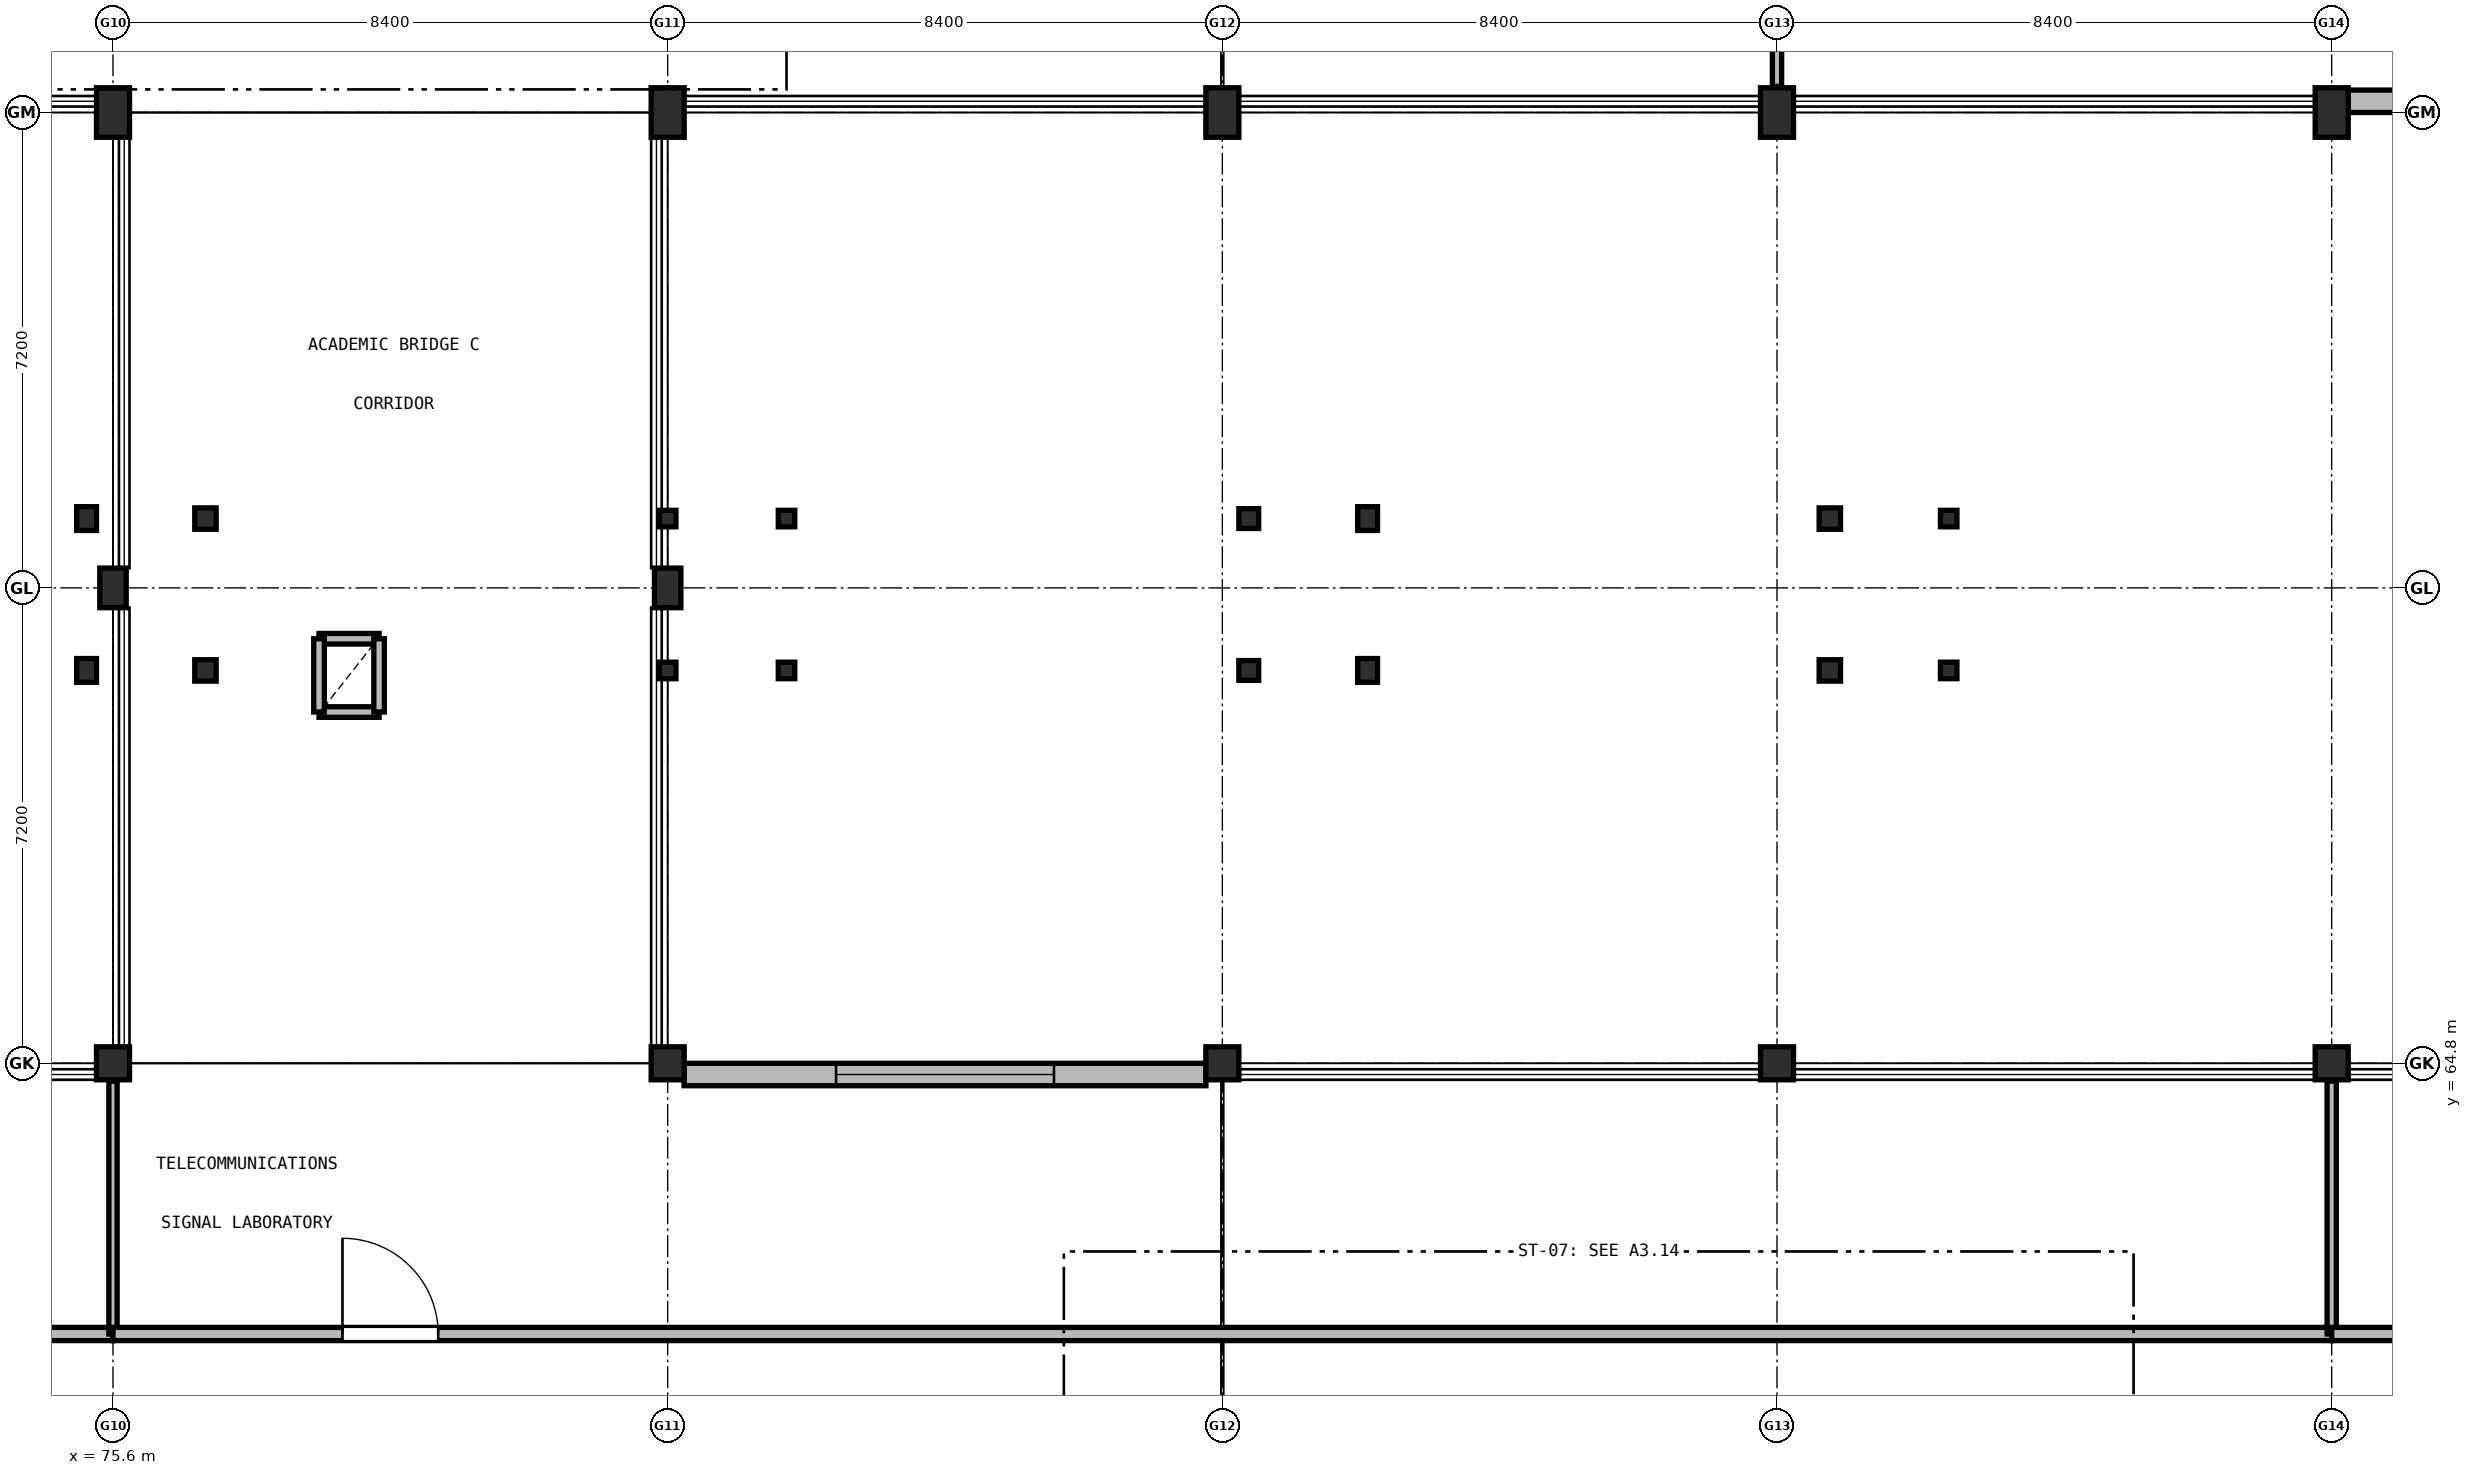
"""IFC4 building model, lengths in metres.
Left out: names, types, materials, properties, quantities, classifications, styles, units other than length and angle.
Written with IfcOpenShell. Run it as: python <this file> out.ifc"""

import sys

from ifc_helpers import new_model, si_unit, direction, frame, frame_2d, origin, origin_2d, place, context, subcontext, project, spatial, rectangle, hollow_rectangle, hollow_circle, i_section, extrude, element, fill, save


model = new_model("IFC4")
c1 = context("Model", 3, precision=1e-05, world=origin(), true_north=direction((0.0, 1.0)))
c2 = subcontext(c1, "Body", "Model", "MODEL_VIEW")
j1 = project(units=[si_unit("LENGTHUNIT", "METRE"), si_unit("PLANEANGLEUNIT", "RADIAN")], contexts=[c1])
p1 = place(None, origin())
s1 = spatial("IfcSite", under=j1, at=p1, CompositionType="ELEMENT")
p2 = place(p1, origin())
s2 = spatial("IfcBuilding", under=s1, at=p2, CompositionType="ELEMENT")
p3 = place(p2, frame((0.0, 0.0, 5.1)))
s3 = spatial("IfcBuildingStorey", under=s2, at=p3, CompositionType="ELEMENT", Elevation=5.1)
p4 = place(p3, frame((75.6, 64.8, 0.0), z_axis=(0.0, 0.0, 1.0), x_axis=(1.0, 0.0, 0.0)))
e1 = element("IfcColumn", 1, at=p4, inside=s3, PredefinedType="COLUMN", context=c2, shape_type="SweptSolid", body=[
    extrude(rectangle(XDim=0.5, YDim=0.5, at=origin_2d()), origin(), (0.0, 0.0, 1.0), 4.2),
])
p5 = place(p3, frame((75.6, 72.0, 0.0), z_axis=(0.0, 0.0, 1.0), x_axis=(1.0, 0.0, 0.0)))
e2 = element("IfcColumn", 2, at=p5, inside=s3, PredefinedType="COLUMN", context=c2, shape_type="SweptSolid", body=[
    extrude(rectangle(XDim=0.4, YDim=0.6, at=origin_2d()), origin(), (0.0, 0.0, 1.0), 4.2),
])
p6 = place(p3, frame((75.6, 79.2, 0.0), z_axis=(0.0, 0.0, 1.0), x_axis=(1.0, 0.0, 0.0)))
e3 = element("IfcColumn", 3, at=p6, inside=s3, PredefinedType="COLUMN", context=c2, shape_type="SweptSolid", body=[
    extrude(rectangle(XDim=0.5, YDim=0.75, at=origin_2d()), origin(), (0.0, 0.0, 1.0), 4.2),
])
p7 = place(p3, frame((84.0, 64.8, 0.0), z_axis=(0.0, 0.0, 1.0), x_axis=(1.0, 0.0, 0.0)))
e4 = element("IfcColumn", 4, at=p7, inside=s3, PredefinedType="COLUMN", context=c2, shape_type="SweptSolid", body=[
    extrude(rectangle(XDim=0.5, YDim=0.5, at=origin_2d()), origin(), (0.0, 0.0, 1.0), 4.2),
])
p8 = place(p3, frame((84.0, 72.0, 0.0), z_axis=(0.0, 0.0, 1.0), x_axis=(1.0, 0.0, 0.0)))
e5 = element("IfcColumn", 5, at=p8, inside=s3, PredefinedType="COLUMN", context=c2, shape_type="SweptSolid", body=[
    extrude(rectangle(XDim=0.4, YDim=0.6, at=origin_2d()), origin(), (0.0, 0.0, 1.0), 4.2),
])
p9 = place(p3, frame((84.0, 79.2, 0.0), z_axis=(0.0, 0.0, 1.0), x_axis=(1.0, 0.0, 0.0)))
e6 = element("IfcColumn", 6, at=p9, inside=s3, PredefinedType="COLUMN", context=c2, shape_type="SweptSolid", body=[
    extrude(rectangle(XDim=0.5, YDim=0.75, at=origin_2d()), origin(), (0.0, 0.0, 1.0), 4.2),
])
p10 = place(p3, frame((92.4, 64.8, 0.0), z_axis=(0.0, 0.0, 1.0), x_axis=(1.0, 0.0, 0.0)))
e7 = element("IfcColumn", 7, at=p10, inside=s3, PredefinedType="COLUMN", context=c2, shape_type="SweptSolid", body=[
    extrude(rectangle(XDim=0.5, YDim=0.5, at=origin_2d()), origin(), (0.0, 0.0, 1.0), 4.2),
])
p11 = place(p3, frame((92.4, 79.2, 0.0), z_axis=(0.0, 0.0, 1.0), x_axis=(1.0, 0.0, 0.0)))
e8 = element("IfcColumn", 8, at=p11, inside=s3, PredefinedType="COLUMN", context=c2, shape_type="SweptSolid", body=[
    extrude(rectangle(XDim=0.5, YDim=0.75, at=origin_2d()), origin(), (0.0, 0.0, 1.0), 4.2),
])
p12 = place(p3, frame((100.8, 64.8, 0.0), z_axis=(0.0, 0.0, 1.0), x_axis=(1.0, 0.0, 0.0)))
e9 = element("IfcColumn", 9, at=p12, inside=s3, PredefinedType="COLUMN", context=c2, shape_type="SweptSolid", body=[
    extrude(rectangle(XDim=0.5, YDim=0.5, at=origin_2d()), origin(), (0.0, 0.0, 1.0), 4.2),
])
p13 = place(p3, frame((100.8, 79.2, 0.0), z_axis=(0.0, 0.0, 1.0), x_axis=(1.0, 0.0, 0.0)))
e10 = element("IfcColumn", 10, at=p13, inside=s3, PredefinedType="COLUMN", context=c2, shape_type="SweptSolid", body=[
    extrude(rectangle(XDim=0.5, YDim=0.75, at=origin_2d()), origin(), (0.0, 0.0, 1.0), 4.2),
])
p14 = place(p3, frame((109.2, 64.8, 0.0), z_axis=(0.0, 0.0, 1.0), x_axis=(1.0, 0.0, 0.0)))
e11 = element("IfcColumn", 11, at=p14, inside=s3, PredefinedType="COLUMN", context=c2, shape_type="SweptSolid", body=[
    extrude(rectangle(XDim=0.5, YDim=0.5, at=origin_2d()), origin(), (0.0, 0.0, 1.0), 4.2),
])
p15 = place(p3, frame((109.2, 79.2, 0.0), z_axis=(0.0, 0.0, 1.0), x_axis=(1.0, 0.0, 0.0)))
e12 = element("IfcColumn", 12, at=p15, inside=s3, PredefinedType="COLUMN", context=c2, shape_type="SweptSolid", body=[
    extrude(rectangle(XDim=0.5, YDim=0.75, at=origin_2d()), origin(), (0.0, 0.0, 1.0), 4.2),
])
for number, where, z_axis, x_axis in (
    (13, (103.4, 70.75, 0.0), (0.0, 0.0, 1.0), (1.0, 0.0, 0.0)),
    (14, (103.4, 73.05, 0.0), (0.0, 0.0, 1.0), (1.0, 0.0, 0.0)),
):
    element("IfcColumn", number, at=place(p3, frame(where, z_axis=z_axis, x_axis=x_axis)), inside=s3, PredefinedType="COLUMN", context=c2, shape_type="SweptSolid", body=[
        extrude(hollow_rectangle(XDim=0.25, YDim=0.25, WallThickness=0.01, at=origin_2d()), origin(), (0.0, 0.0, 1.0), 4.2),
    ])
for number, where, z_axis, x_axis in (
    (15, (101.6, 70.75, 0.0), (0.0, 0.0, 1.0), (1.0, 0.0, 0.0)),
    (16, (101.6, 73.05, 0.0), (0.0, 0.0, 1.0), (1.0, 0.0, 0.0)),
):
    element("IfcColumn", number, at=place(p3, frame(where, z_axis=z_axis, x_axis=x_axis)), inside=s3, PredefinedType="COLUMN", context=c2, shape_type="SweptSolid", body=[
        extrude(hollow_circle(Radius=0.162, WallThickness=0.012, at=origin_2d()), origin(), (0.0, 0.0, 1.0), 4.2),
    ])
for number, where, z_axis, x_axis in (
    (17, (94.6, 70.75, 0.0), (0.0, 0.0, 1.0), (1.0, 0.0, 0.0)),
    (18, (94.6, 73.05, 0.0), (0.0, 0.0, 1.0), (1.0, 0.0, 0.0)),
):
    element("IfcColumn", number, at=place(p3, frame(where, z_axis=z_axis, x_axis=x_axis)), inside=s3, PredefinedType="COLUMN", context=c2, shape_type="SweptSolid", body=[
        extrude(i_section(OverallWidth=0.3, OverallDepth=0.36, WebThickness=0.012, FlangeThickness=0.022, FilletRadius=0.027, at=origin_2d()), origin(), (0.0, 0.0, 1.0), 4.2),
    ])
for number, where, z_axis, x_axis in (
    (19, (92.8, 70.75, 0.0), (0.0, 0.0, 1.0), (1.0, 0.0, 0.0)),
    (20, (92.8, 73.05, 0.0), (0.0, 0.0, 1.0), (1.0, 0.0, 0.0)),
):
    element("IfcColumn", number, at=place(p3, frame(where, z_axis=z_axis, x_axis=x_axis)), inside=s3, PredefinedType="COLUMN", context=c2, shape_type="SweptSolid", body=[
        extrude(i_section(OverallWidth=0.3, OverallDepth=0.3, WebThickness=0.011, FlangeThickness=0.019, FilletRadius=0.027, at=origin_2d()), origin(), (0.0, 0.0, 1.0), 4.2),
    ])
for number, where, z_axis, x_axis in (
    (21, (85.8, 70.75, 0.0), (0.0, 0.0, 1.0), (1.0, 0.0, 0.0)),
    (22, (85.8, 73.05, 0.0), (0.0, 0.0, 1.0), (1.0, 0.0, 0.0)),
    (23, (84.0, 70.75, 0.0), (0.0, 0.0, 1.0), (1.0, 0.0, 0.0)),
    (24, (84.0, 73.05, 0.0), (0.0, 0.0, 1.0), (1.0, 0.0, 0.0)),
):
    element("IfcColumn", number, at=place(p3, frame(where, z_axis=z_axis, x_axis=x_axis)), inside=s3, PredefinedType="COLUMN", context=c2, shape_type="SweptSolid", body=[
        extrude(hollow_rectangle(XDim=0.25, YDim=0.25, WallThickness=0.01, at=origin_2d()), origin(), (0.0, 0.0, 1.0), 4.2),
    ])
for number, where, z_axis, x_axis in (
    (25, (77.0, 70.75, 0.0), (0.0, 0.0, 1.0), (1.0, 0.0, 0.0)),
    (26, (77.0, 73.05, 0.0), (0.0, 0.0, 1.0), (1.0, 0.0, 0.0)),
):
    element("IfcColumn", number, at=place(p3, frame(where, z_axis=z_axis, x_axis=x_axis)), inside=s3, PredefinedType="COLUMN", context=c2, shape_type="SweptSolid", body=[
        extrude(hollow_circle(Radius=0.162, WallThickness=0.012, at=origin_2d()), origin(), (0.0, 0.0, 1.0), 4.2),
    ])
for number, where, z_axis, x_axis in (
    (27, (75.2, 70.75, 0.0), (0.0, 0.0, 1.0), (1.0, 0.0, 0.0)),
    (28, (75.2, 73.05, 0.0), (0.0, 0.0, 1.0), (1.0, 0.0, 0.0)),
):
    element("IfcColumn", number, at=place(p3, frame(where, z_axis=z_axis, x_axis=x_axis)), inside=s3, PredefinedType="COLUMN", context=c2, shape_type="SweptSolid", body=[
        extrude(i_section(OverallWidth=0.3, OverallDepth=0.36, WebThickness=0.012, FlangeThickness=0.022, FilletRadius=0.027, at=origin_2d()), origin(), (0.0, 0.0, 1.0), 4.2),
    ])
p16 = place(p3, frame((117.352, 79.37, 0.0), z_axis=(0.0, 0.0, 1.0), x_axis=(-1.0, 0.0, 0.0)))
e29 = element("IfcWall", 29, at=p16, inside=s3, PredefinedType="SOLIDWALL", context=c2, shape_type="SweptSolid", body=[
    extrude(rectangle(XDim=7.904, YDim=0.34, at=frame_2d((3.952, 0.0))), origin(), (0.0, 0.0, 1.0), 3.11),
])
p17 = place(p16, frame((2.402, 0.0, 0.95)))
e30 = element("IfcOpeningElement", 30, at=p17, cuts=e29, PredefinedType="OPENING", context=c2, shape_type="SweptSolid", body=[
    extrude(rectangle(XDim=3.1, YDim=1.91, at=frame_2d((1.55, 0.955))), frame((0.0, 0.18, 0.0), z_axis=(0.0, -1.0, 0.0), x_axis=(1.0, 0.0, 0.0)), (0.0, 0.0, 1.0), 0.36),
])
p18 = place(p3, frame((84.248, 64.63, 0.0), z_axis=(0.0, 0.0, 1.0), x_axis=(1.0, 0.0, 0.0)))
e31 = element("IfcWall", 31, at=p18, inside=s3, PredefinedType="SOLIDWALL", context=c2, shape_type="SweptSolid", body=[
    extrude(rectangle(XDim=7.904, YDim=0.34, at=frame_2d((3.952, 0.0))), origin(), (0.0, 0.0, 1.0), 3.11),
])
p19 = place(p18, frame((2.302, 0.0, 0.95)))
e32 = element("IfcOpeningElement", 32, at=p19, cuts=e31, PredefinedType="OPENING", context=c2, shape_type="SweptSolid", body=[
    extrude(rectangle(XDim=3.3, YDim=1.65, at=frame_2d((1.65, 0.825))), frame((0.0, 0.18, 0.0), z_axis=(0.0, -1.0, 0.0), x_axis=(1.0, 0.0, 0.0)), (0.0, 0.0, 1.0), 0.36),
])
for number, where, z_axis, x_axis in (
    (33, (78.72, 70.12, 0.0), (0.0, 0.0, 1.0), (1.0, 0.0, 0.0)),
    (34, (79.63, 71.23, 0.0), (0.0, 0.0, 1.0), (-1.0, 0.0, 0.0)),
):
    element("IfcWall", number, at=place(p3, frame(where, z_axis=z_axis, x_axis=x_axis)), inside=s3, PredefinedType="PARTITIONING", context=c2, shape_type="SweptSolid", body=[
        extrude(rectangle(XDim=0.91, YDim=0.16, at=frame_2d((0.455, 0.0))), origin(), (0.0, 0.0, 1.0), 3.65),
    ])
for number, where, z_axis, x_axis in (
    (35, (78.72, 71.23, 0.0), (0.0, 0.0, 1.0), (0.0, -1.0, 0.0)),
    (36, (79.63, 70.12, 0.0), (0.0, 0.0, 1.0), (0.0, 1.0, 0.0)),
):
    element("IfcWall", number, at=place(p3, frame(where, z_axis=z_axis, x_axis=x_axis)), inside=s3, PredefinedType="PARTITIONING", context=c2, shape_type="SweptSolid", body=[
        extrude(rectangle(XDim=1.11, YDim=0.16, at=frame_2d((0.555, 0.0))), origin(), (0.0, 0.0, 1.0), 3.65),
    ])
p20 = place(p3, frame((100.8, 79.595, 0.0), z_axis=(0.0, 0.0, 1.0), x_axis=(0.0, 1.0, 0.0)))
e37 = element("IfcWall", 37, at=p20, inside=s3, PredefinedType="PARTITIONING", context=c2, shape_type="SweptSolid", body=[
    extrude(rectangle(XDim=6.41, YDim=0.14, at=frame_2d((3.205, 0.0))), origin(), (0.0, 0.0, 1.0), 3.105),
])
p21 = place(p3, frame((42.0, 60.7, 0.0), z_axis=(0.0, 0.0, 1.0), x_axis=(1.0, 0.0, 0.0)))
e38 = element("IfcWall", 38, at=p21, inside=s3, PredefinedType="SOLIDWALL", context=c2, shape_type="SweptSolid", body=[
    extrude(rectangle(XDim=33.6, YDim=0.2, at=frame_2d((16.8, 0.0))), origin(), (0.0, 0.0, 1.0), 3.305),
])
p22 = place(p21, frame((3.7, 0.0, 0.0)))
e39 = element("IfcOpeningElement", 39, at=p22, cuts=e38, PredefinedType="OPENING", context=c2, shape_type="SweptSolid", body=[
    extrude(rectangle(XDim=1.0, YDim=2.1, at=frame_2d((0.5, 1.05))), frame((0.0, 0.11, 0.0), z_axis=(0.0, -1.0, 0.0), x_axis=(1.0, 0.0, 0.0)), (0.0, 0.0, 1.0), 0.22),
])
p23 = place(p3, frame((75.6, 60.7, 0.0), z_axis=(0.0, 0.0, 1.0), x_axis=(0.0, 1.0, 0.0)))
e40 = element("IfcWall", 40, at=p23, inside=s3, PredefinedType="PARTITIONING", context=c2, shape_type="SweptSolid", body=[
    extrude(rectangle(XDim=3.83, YDim=0.125, at=frame_2d((1.915, 0.0))), origin(), (0.0, 0.0, 1.0), 3.105),
])
p24 = place(p3, frame((75.6, 60.7, 0.0), z_axis=(0.0, 0.0, 1.0), x_axis=(1.0, 0.0, 0.0)))
e41 = element("IfcWall", 41, at=p24, inside=s3, PredefinedType="SOLIDWALL", context=c2, shape_type="SweptSolid", body=[
    extrude(rectangle(XDim=33.6, YDim=0.2, at=frame_2d((16.8, 0.0))), origin(), (0.0, 0.0, 1.0), 3.305),
])
p25 = place(p24, frame((3.475, 0.0, 0.0)))
e42 = element("IfcOpeningElement", 42, at=p25, cuts=e41, PredefinedType="OPENING", context=c2, shape_type="SweptSolid", body=[
    extrude(rectangle(XDim=1.45, YDim=2.2, at=frame_2d((0.725, 1.1))), frame((0.0, 0.11, 0.0), z_axis=(0.0, -1.0, 0.0), x_axis=(1.0, 0.0, 0.0)), (0.0, 0.0, 1.0), 0.22),
])
p26 = place(p3, frame((109.2, 60.7, 0.0), z_axis=(0.0, 0.0, 1.0), x_axis=(0.0, 1.0, 0.0)))
e43 = element("IfcWall", 43, at=p26, inside=s3, PredefinedType="PARTITIONING", context=c2, shape_type="SweptSolid", body=[
    extrude(rectangle(XDim=3.83, YDim=0.14, at=frame_2d((1.915, 0.0))), origin(), (0.0, 0.0, 1.0), 3.105),
])
p27 = place(p3, frame((109.2, 60.7, 0.0), z_axis=(0.0, 0.0, 1.0), x_axis=(1.0, 0.0, 0.0)))
e44 = element("IfcWall", 44, at=p27, inside=s3, PredefinedType="SOLIDWALL", context=c2, shape_type="SweptSolid", body=[
    extrude(rectangle(XDim=24.98, YDim=0.2, at=frame_2d((12.49, 0.0))), origin(), (0.0, 0.0, 1.0), 3.305),
])
p28 = place(p27, frame((3.425, 0.0, 0.0)))
e45 = element("IfcOpeningElement", 45, at=p28, cuts=e44, PredefinedType="OPENING", context=c2, shape_type="SweptSolid", body=[
    extrude(rectangle(XDim=1.55, YDim=2.2, at=frame_2d((0.775, 1.1))), frame((0.0, 0.11, 0.0), z_axis=(0.0, -1.0, 0.0), x_axis=(1.0, 0.0, 0.0)), (0.0, 0.0, 1.0), 0.22),
])
p29 = place(p19, origin())
e46 = element("IfcWindow", 46, at=p29, inside=s3, PartitioningType="SINGLE_PANEL", PredefinedType="WINDOW", context=c2, shape_type="SweptSolid", body=[
    extrude(rectangle(XDim=3.3, YDim=1.65, at=frame_2d((1.65, 0.825))), frame((0.0, 0.03, 0.0), z_axis=(0.0, -1.0, 0.0), x_axis=(1.0, 0.0, 0.0)), (0.0, 0.0, 1.0), 0.06),
])
fill(e32, e46)
p30 = place(p25, origin())
e47 = element("IfcDoor", 47, at=p30, inside=s3, OperationType="SINGLE_SWING_LEFT", PredefinedType="DOOR", context=c2, shape_type="SweptSolid", body=[
    extrude(rectangle(XDim=1.45, YDim=2.2, at=frame_2d((0.725, 1.1))), frame((0.0, 0.025, 0.0), z_axis=(0.0, -1.0, 0.0), x_axis=(1.0, 0.0, 0.0)), (0.0, 0.0, 1.0), 0.05),
])
fill(e42, e47)
save(model, sys.argv[1])
